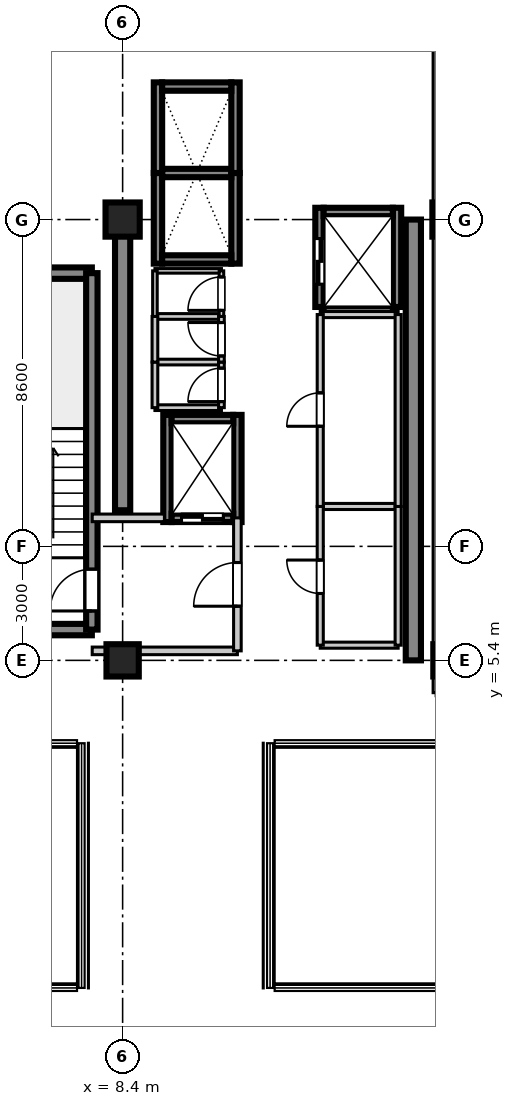
"""IFC4 building model, lengths in metres.
Left out: names, types, materials, properties, quantities, classifications, styles, units other than length and angle.
Written with IfcOpenShell. Run it as: python <this file> out.ifc"""

import sys

from ifc_helpers import new_model, si_unit, direction, frame, frame_2d, origin, origin_2d, place, context, subcontext, project, spatial, rectangle, extrude, source, transform, mapped, element, fill, save


model = new_model("IFC4")
c1 = context("Model", 3, precision=1e-05, world=origin(), true_north=direction((0.0, 1.0)))
c2 = subcontext(c1, "Body", "Model", "MODEL_VIEW")
j1 = project(units=[si_unit("LENGTHUNIT", "METRE"), si_unit("PLANEANGLEUNIT", "RADIAN")], contexts=[c1])
p1 = place(None, origin())
s1 = spatial("IfcSite", under=j1, at=p1, CompositionType="ELEMENT")
p2 = place(p1, origin())
s2 = spatial("IfcBuilding", under=s1, at=p2, CompositionType="ELEMENT")
p3 = place(p2, frame((0.0, 0.0, 304.2)))
s3 = spatial("IfcBuildingStorey", under=s2, at=p3, CompositionType="ELEMENT", Elevation=304.2)
m1 = source(origin(), c2, "Body", "SweptSolid", [
    extrude(rectangle(XDim=0.85, YDim=0.85, at=origin_2d()), origin(), (0.0, 0.0, 1.0), 3.805),
])
p4 = place(p3, frame((8.4, 5.4, 0.0), z_axis=(0.0, 0.0, 1.0), x_axis=(1.0, 0.0, 0.0)))
e1 = element("IfcColumn", 1, at=p4, inside=s3, PredefinedType="PILASTER", context=c2, shape_type="MappedRepresentation", body=[
    mapped(m1, transform((0.0, 0.0, 0.0), scale=1.0)),
])
m2 = source(origin(), c2, "Body", "SweptSolid", [
    extrude(rectangle(XDim=0.9, YDim=0.9, at=origin_2d()), origin(), (0.0, 0.0, 1.0), 3.805),
])
p5 = place(p3, frame((8.4, 17.0, 0.0), z_axis=(0.0, 0.0, 1.0), x_axis=(1.0, 0.0, 0.0)))
e2 = element("IfcColumn", 2, at=p5, inside=s3, PredefinedType="COLUMN", context=c2, shape_type="MappedRepresentation", body=[
    mapped(m2, transform((0.0, 0.0, 0.0), scale=1.0)),
])
p6 = place(p3, frame((17.0, 5.4, 0.0), z_axis=(0.0, 0.0, 1.0), x_axis=(1.0, 0.0, 0.0)))
e3 = element("IfcColumn", 3, at=p6, inside=s3, PredefinedType="PILASTER", context=c2, shape_type="MappedRepresentation", body=[
    mapped(m1, transform((0.0, 0.0, 0.0), scale=1.0)),
])
p7 = place(p3, frame((17.0, 17.0, 0.0), z_axis=(0.0, 0.0, 1.0), x_axis=(1.0, 0.0, 0.0)))
e4 = element("IfcColumn", 4, at=p7, inside=s3, PredefinedType="COLUMN", context=c2, shape_type="MappedRepresentation", body=[
    mapped(m2, transform((0.0, 0.0, 0.0), scale=1.0)),
])
m3 = source(origin(), c2, "Body", "SweptSolid", [
    extrude(rectangle(XDim=7.65, YDim=0.4, at=frame_2d((3.825, 0.0))), origin(), (0.0, 0.0, 1.0), 3.55),
])
p8 = place(p3, frame((8.4, 9.35, 0.0), z_axis=(0.0, 0.0, 1.0), x_axis=(0.0, 1.0, 0.0)))
e5 = element("IfcWall", 5, at=p8, inside=s3, PredefinedType="SHEAR", context=c2, shape_type="MappedRepresentation", body=[
    mapped(m3, transform((0.0, 0.0, 0.0), scale=1.0)),
])
m4 = source(origin(), c2, "Body", "SweptSolid", [
    extrude(rectangle(XDim=11.6, YDim=0.4, at=frame_2d((5.8, 0.0))), origin(), (0.0, 0.0, 1.0), 3.55),
])
p9 = place(p3, frame((16.05, 5.4, 0.0), z_axis=(0.0, 0.0, 1.0), x_axis=(0.0, 1.0, 0.0)))
e6 = element("IfcWall", 6, at=p9, inside=s3, PredefinedType="SHEAR", context=c2, shape_type="MappedRepresentation", body=[
    mapped(m4, transform((0.0, 0.0, 0.0), scale=1.0)),
])
m5 = source(origin(), c2, "Body", "SweptSolid", [
    extrude(rectangle(XDim=3.98, YDim=0.3, at=frame_2d((1.99, 0.0))), origin(), (0.0, 0.0, 1.0), 3.55),
])
for number, where, z_axis, x_axis in (
    (7, (3.61, 6.21, 0.0), (0.0, 0.0, 1.0), (1.0, 0.0, 0.0)),
    (8, (3.61, 15.59, 0.0), (0.0, 0.0, 1.0), (1.0, 0.0, 0.0)),
):
    element("IfcWall", number, at=place(p3, frame(where, z_axis=z_axis, x_axis=x_axis)), inside=s3, PredefinedType="SHEAR", context=c2, shape_type="MappedRepresentation", body=[
        mapped(m5, transform((0.0, 0.0, 0.0), scale=1.0)),
    ])
m6 = source(origin(), c2, "Body", "SweptSolid", [
    extrude(rectangle(XDim=9.38, YDim=0.3, at=frame_2d((4.69, 0.0))), origin(), (0.0, 0.0, 1.0), 3.55),
])
p10 = place(p3, frame((7.59, 6.21, 0.0), z_axis=(0.0, 0.0, 1.0), x_axis=(0.0, 1.0, 0.0)))
e9 = element("IfcWall", 9, at=p10, inside=s3, PredefinedType="SHEAR", context=c2, shape_type="MappedRepresentation", body=[
    mapped(m6, transform((0.0, 0.0, 0.0), scale=1.0)),
])
p11 = place(p10, frame((0.49, 0.0, 0.0)))
e10 = element("IfcOpeningElement", 10, at=p11, cuts=e9, PredefinedType="OPENING", context=c2, shape_type="SweptSolid", body=[
    extrude(rectangle(XDim=1.1, YDim=2.15, at=frame_2d((0.55, 1.075))), frame((0.0, 0.16, 0.0), z_axis=(0.0, -1.0, 0.0), x_axis=(1.0, 0.0, 0.0)), (0.0, 0.0, 1.0), 0.32),
])
m7 = source(origin(), c2, "Body", "SweptSolid", [
    extrude(rectangle(XDim=2.385, YDim=0.22, at=frame_2d((1.192, 0.0))), origin(), (0.0, 0.0, 1.0), 3.55),
])
for number, where, z_axis, x_axis in (
    (11, (9.33, 15.84, 0.0), (0.0, 0.0, 1.0), (0.0, 1.0, 0.0)),
    (12, (11.37, 15.84, 0.0), (0.0, 0.0, 1.0), (0.0, 1.0, 0.0)),
):
    element("IfcWall", number, at=place(p3, frame(where, z_axis=z_axis, x_axis=x_axis)), inside=s3, PredefinedType="SHEAR", context=c2, shape_type="MappedRepresentation", body=[
        mapped(m7, transform((0.0, 0.0, 0.0), scale=1.0)),
    ])
m8 = source(origin(), c2, "Body", "SweptSolid", [
    extrude(rectangle(XDim=1.82, YDim=0.22, at=frame_2d((0.91, 0.0))), origin(), (0.0, 0.0, 1.0), 3.55),
])
p12 = place(p3, frame((9.44, 15.95, 0.0), z_axis=(0.0, 0.0, 1.0), x_axis=(1.0, 0.0, 0.0)))
e13 = element("IfcWall", 13, at=p12, inside=s3, PredefinedType="SHEAR", context=c2, shape_type="MappedRepresentation", body=[
    mapped(m8, transform((0.0, 0.0, 0.0), scale=1.0)),
])
m9 = source(origin(), c2, "Body", "SweptSolid", [
    extrude(rectangle(XDim=1.82, YDim=0.22, at=frame_2d((0.91, 0.0))), origin(), (0.0, 0.0, 1.0), 3.85),
])
p13 = place(p3, frame((9.44, 18.225, 0.0), z_axis=(0.0, 0.0, 1.0), x_axis=(1.0, 0.0, 0.0)))
e14 = element("IfcWall", 14, at=p13, inside=s3, PredefinedType="SHEAR", context=c2, shape_type="MappedRepresentation", body=[
    mapped(m9, transform((0.0, 0.0, 0.0), scale=1.0)),
])
for number, where, z_axis, x_axis in (
    (15, (9.33, 18.225, 0.0), (0.0, 0.0, 1.0), (0.0, 1.0, 0.0)),
    (16, (11.37, 18.225, 0.0), (0.0, 0.0, 1.0), (0.0, 1.0, 0.0)),
):
    element("IfcWall", number, at=place(p3, frame(where, z_axis=z_axis, x_axis=x_axis)), inside=s3, PredefinedType="SHEAR", context=c2, shape_type="MappedRepresentation", body=[
        mapped(m7, transform((0.0, 0.0, 0.0), scale=1.0)),
    ])
p14 = place(p3, frame((9.44, 20.5, 0.0), z_axis=(0.0, 0.0, 1.0), x_axis=(1.0, 0.0, 0.0)))
e17 = element("IfcWall", 17, at=p14, inside=s3, PredefinedType="SHEAR", context=c2, shape_type="MappedRepresentation", body=[
    mapped(m8, transform((0.0, 0.0, 0.0), scale=1.0)),
])
m10 = source(origin(), c2, "Body", "SweptSolid", [
    extrude(rectangle(XDim=2.82, YDim=0.22, at=frame_2d((1.41, 0.0))), origin(), (0.0, 0.0, 1.0), 3.55),
])
for number, where, z_axis, x_axis in (
    (18, (9.58, 9.04, 0.0), (0.0, 0.0, 1.0), (0.0, 1.0, 0.0)),
    (19, (11.42, 9.04, 0.0), (0.0, 0.0, 1.0), (0.0, 1.0, 0.0)),
):
    element("IfcWall", number, at=place(p3, frame(where, z_axis=z_axis, x_axis=x_axis)), inside=s3, PredefinedType="SHEAR", context=c2, shape_type="MappedRepresentation", body=[
        mapped(m10, transform((0.0, 0.0, 0.0), scale=1.0)),
    ])
m11 = source(origin(), c2, "Body", "SweptSolid", [
    extrude(rectangle(XDim=1.62, YDim=0.22, at=frame_2d((0.81, 0.0))), origin(), (0.0, 0.0, 1.0), 3.55),
])
p15 = place(p3, frame((9.69, 9.15, 0.0), z_axis=(0.0, 0.0, 1.0), x_axis=(1.0, 0.0, 0.0)))
e20 = element("IfcWall", 20, at=p15, inside=s3, PredefinedType="SHEAR", context=c2, shape_type="MappedRepresentation", body=[
    mapped(m11, transform((0.0, 0.0, 0.0), scale=1.0)),
])
p16 = place(p15, frame((0.26, 0.0, 0.0)))
e21 = element("IfcOpeningElement", 21, at=p16, cuts=e20, PredefinedType="OPENING", context=c2, shape_type="SweptSolid", body=[
    extrude(rectangle(XDim=1.1, YDim=2.2, at=frame_2d((0.55, 1.1))), frame((0.0, 0.12, 0.0), z_axis=(0.0, -1.0, 0.0), x_axis=(1.0, 0.0, 0.0)), (0.0, 0.0, 1.0), 0.24),
])
p17 = place(p3, frame((9.69, 11.75, 0.0), z_axis=(0.0, 0.0, 1.0), x_axis=(1.0, 0.0, 0.0)))
e22 = element("IfcWall", 22, at=p17, inside=s3, PredefinedType="SHEAR", context=c2, shape_type="MappedRepresentation", body=[
    mapped(m11, transform((0.0, 0.0, 0.0), scale=1.0)),
])
m12 = source(origin(), c2, "Body", "SweptSolid", [
    extrude(rectangle(XDim=2.61, YDim=0.22, at=frame_2d((1.305, 0.0))), origin(), (0.0, 0.0, 1.0), 3.55),
])
p18 = place(p3, frame((13.58, 14.7, 0.0), z_axis=(0.0, 0.0, 1.0), x_axis=(0.0, 1.0, 0.0)))
e23 = element("IfcWall", 23, at=p18, inside=s3, PredefinedType="SHEAR", context=c2, shape_type="MappedRepresentation", body=[
    mapped(m12, transform((0.0, 0.0, 0.0), scale=1.0)),
])
p19 = place(p18, frame((0.6, 0.0, 0.0)))
e24 = element("IfcOpeningElement", 24, at=p19, cuts=e23, PredefinedType="OPENING", context=c2, shape_type="SweptSolid", body=[
    extrude(rectangle(XDim=1.2, YDim=2.2, at=frame_2d((0.6, 1.1))), frame((0.0, 0.12, 0.0), z_axis=(0.0, -1.0, 0.0), x_axis=(1.0, 0.0, 0.0)), (0.0, 0.0, 1.0), 0.24),
])
p20 = place(p3, frame((15.62, 14.7, 0.0), z_axis=(0.0, 0.0, 1.0), x_axis=(0.0, 1.0, 0.0)))
e25 = element("IfcWall", 25, at=p20, inside=s3, PredefinedType="SHEAR", context=c2, shape_type="MappedRepresentation", body=[
    mapped(m12, transform((0.0, 0.0, 0.0), scale=1.0)),
])
p21 = place(p3, frame((13.69, 17.2, 0.0), z_axis=(0.0, 0.0, 1.0), x_axis=(1.0, 0.0, 0.0)))
e26 = element("IfcWall", 26, at=p21, inside=s3, PredefinedType="SHEAR", context=c2, shape_type="MappedRepresentation", body=[
    mapped(m8, transform((0.0, 0.0, 0.0), scale=1.0)),
])
m13 = source(origin(), c2, "Body", "SweptSolid", [
    extrude(rectangle(XDim=3.82, YDim=0.2, at=frame_2d((1.91, 0.0))), origin(), (0.0, 0.0, 1.0), 2.89),
])
p22 = place(p3, frame((7.6, 5.65, 0.0), z_axis=(0.0, 0.0, 1.0), x_axis=(1.0, 0.0, 0.0)))
e27 = element("IfcWall", 27, at=p22, inside=s3, PredefinedType="PARTITIONING", context=c2, shape_type="MappedRepresentation", body=[
    mapped(m13, transform((0.0, 0.0, 0.0), scale=1.0)),
])
m14 = source(origin(), c2, "Body", "SweptSolid", [
    extrude(rectangle(XDim=1.9, YDim=0.2, at=frame_2d((0.95, 0.0))), origin(), (0.0, 0.0, 1.0), 2.89),
])
p23 = place(p3, frame((7.6, 9.15, 0.0), z_axis=(0.0, 0.0, 1.0), x_axis=(1.0, 0.0, 0.0)))
e28 = element("IfcWall", 28, at=p23, inside=s3, PredefinedType="PARTITIONING", context=c2, shape_type="MappedRepresentation", body=[
    mapped(m14, transform((0.0, 0.0, 0.0), scale=1.0)),
])
m15 = source(origin(), c2, "Body", "SweptSolid", [
    extrude(rectangle(XDim=3.5, YDim=0.2, at=frame_2d((1.75, 0.0))), origin(), (0.0, 0.0, 1.0), 2.89),
])
p24 = place(p3, frame((11.42, 5.65, 0.0), z_axis=(0.0, 0.0, 1.0), x_axis=(0.0, 1.0, 0.0)))
e29 = element("IfcWall", 29, at=p24, inside=s3, PredefinedType="PARTITIONING", context=c2, shape_type="MappedRepresentation", body=[
    mapped(m15, transform((0.0, 0.0, 0.0), scale=1.0)),
])
p25 = place(p24, frame((1.175, 0.0, 0.0)))
e30 = element("IfcOpeningElement", 30, at=p25, cuts=e29, PredefinedType="OPENING", context=c2, shape_type="SweptSolid", body=[
    extrude(rectangle(XDim=1.15, YDim=2.15, at=frame_2d((0.575, 1.075))), frame((0.0, 0.11, 0.0), z_axis=(0.0, -1.0, 0.0), x_axis=(1.0, 0.0, 0.0)), (0.0, 0.0, 1.0), 0.22),
])
m16 = source(origin(), c2, "Body", "SweptSolid", [
    extrude(rectangle(XDim=1.75, YDim=0.15, at=frame_2d((0.875, 0.0))), origin(), (0.0, 0.0, 1.0), 2.89),
])
for number, where, z_axis, x_axis in (
    (31, (9.25, 12.05, 0.0), (0.0, 0.0, 1.0), (1.0, 0.0, 0.0)),
    (32, (9.25, 13.25, 0.0), (0.0, 0.0, 1.0), (1.0, 0.0, 0.0)),
):
    element("IfcWall", number, at=place(p3, frame(where, z_axis=z_axis, x_axis=x_axis)), inside=s3, PredefinedType="PARTITIONING", context=c2, shape_type="MappedRepresentation", body=[
        mapped(m16, transform((0.0, 0.0, 0.0), scale=1.0)),
    ])
m17 = source(origin(), c2, "Body", "SweptSolid", [
    extrude(rectangle(XDim=1.2, YDim=0.15, at=frame_2d((0.6, 0.0))), origin(), (0.0, 0.0, 1.0), 2.89),
])
p26 = place(p3, frame((9.25, 12.05, 0.0), z_axis=(0.0, 0.0, 1.0), x_axis=(0.0, 1.0, 0.0)))
e33 = element("IfcWall", 33, at=p26, inside=s3, PredefinedType="PARTITIONING", context=c2, shape_type="MappedRepresentation", body=[
    mapped(m17, transform((0.0, 0.0, 0.0), scale=1.0)),
])
p27 = place(p3, frame((11.0, 12.05, 0.0), z_axis=(0.0, 0.0, 1.0), x_axis=(0.0, 1.0, 0.0)))
e34 = element("IfcWall", 34, at=p27, inside=s3, PredefinedType="PARTITIONING", context=c2, shape_type="MappedRepresentation", body=[
    mapped(m17, transform((0.0, 0.0, 0.0), scale=1.0)),
])
p28 = place(p27, frame((0.16, 0.0, 0.0)))
e35 = element("IfcOpeningElement", 35, at=p28, cuts=e34, PredefinedType="OPENING", context=c2, shape_type="SweptSolid", body=[
    extrude(rectangle(XDim=0.88, YDim=2.1, at=frame_2d((0.44, 1.05))), frame((0.0, 0.085, 0.0), z_axis=(0.0, -1.0, 0.0), x_axis=(1.0, 0.0, 0.0)), (0.0, 0.0, 1.0), 0.17),
])
p29 = place(p3, frame((9.25, 14.45, 0.0), z_axis=(0.0, 0.0, 1.0), x_axis=(1.0, 0.0, 0.0)))
e36 = element("IfcWall", 36, at=p29, inside=s3, PredefinedType="PARTITIONING", context=c2, shape_type="MappedRepresentation", body=[
    mapped(m16, transform((0.0, 0.0, 0.0), scale=1.0)),
])
p30 = place(p3, frame((9.25, 13.25, 0.0), z_axis=(0.0, 0.0, 1.0), x_axis=(0.0, 1.0, 0.0)))
e37 = element("IfcWall", 37, at=p30, inside=s3, PredefinedType="PARTITIONING", context=c2, shape_type="MappedRepresentation", body=[
    mapped(m17, transform((0.0, 0.0, 0.0), scale=1.0)),
])
p31 = place(p3, frame((11.0, 13.25, 0.0), z_axis=(0.0, 0.0, 1.0), x_axis=(0.0, 1.0, 0.0)))
e38 = element("IfcWall", 38, at=p31, inside=s3, PredefinedType="PARTITIONING", context=c2, shape_type="MappedRepresentation", body=[
    mapped(m17, transform((0.0, 0.0, 0.0), scale=1.0)),
])
p32 = place(p31, frame((0.16, 0.0, 0.0)))
e39 = element("IfcOpeningElement", 39, at=p32, cuts=e38, PredefinedType="OPENING", context=c2, shape_type="SweptSolid", body=[
    extrude(rectangle(XDim=0.88, YDim=2.1, at=frame_2d((0.44, 1.05))), frame((0.0, 0.085, 0.0), z_axis=(0.0, -1.0, 0.0), x_axis=(1.0, 0.0, 0.0)), (0.0, 0.0, 1.0), 0.17),
])
m18 = source(origin(), c2, "Body", "SweptSolid", [
    extrude(rectangle(XDim=1.75, YDim=0.12, at=frame_2d((0.875, 0.0))), origin(), (0.0, 0.0, 1.0), 2.89),
])
p33 = place(p3, frame((9.25, 15.65, 0.0), z_axis=(0.0, 0.0, 1.0), x_axis=(1.0, 0.0, 0.0)))
e40 = element("IfcWall", 40, at=p33, inside=s3, PredefinedType="PARTITIONING", context=c2, shape_type="MappedRepresentation", body=[
    mapped(m18, transform((0.0, 0.0, 0.0), scale=1.0)),
])
m19 = source(origin(), c2, "Body", "SweptSolid", [
    extrude(rectangle(XDim=1.2, YDim=0.12, at=frame_2d((0.6, 0.0))), origin(), (0.0, 0.0, 1.0), 2.89),
])
p34 = place(p3, frame((9.25, 14.45, 0.0), z_axis=(0.0, 0.0, 1.0), x_axis=(0.0, 1.0, 0.0)))
e41 = element("IfcWall", 41, at=p34, inside=s3, PredefinedType="PARTITIONING", context=c2, shape_type="MappedRepresentation", body=[
    mapped(m19, transform((0.0, 0.0, 0.0), scale=1.0)),
])
p35 = place(p3, frame((11.0, 14.45, 0.0), z_axis=(0.0, 0.0, 1.0), x_axis=(0.0, 1.0, 0.0)))
e42 = element("IfcWall", 42, at=p35, inside=s3, PredefinedType="PARTITIONING", context=c2, shape_type="MappedRepresentation", body=[
    mapped(m19, transform((0.0, 0.0, 0.0), scale=1.0)),
])
p36 = place(p35, frame((0.16, 0.0, 0.0)))
e43 = element("IfcOpeningElement", 43, at=p36, cuts=e42, PredefinedType="OPENING", context=c2, shape_type="SweptSolid", body=[
    extrude(rectangle(XDim=0.88, YDim=2.1, at=frame_2d((0.44, 1.05))), frame((0.0, 0.07, 0.0), z_axis=(0.0, -1.0, 0.0), x_axis=(1.0, 0.0, 0.0)), (0.0, 0.0, 1.0), 0.14),
])
m20 = source(origin(), c2, "Body", "SweptSolid", [
    extrude(rectangle(XDim=2.05, YDim=0.16, at=frame_2d((1.025, 0.0))), origin(), (0.0, 0.0, 1.0), 2.89),
])
for number, where, z_axis, x_axis in (
    (44, (13.6, 5.8, 0.0), (0.0, 0.0, 1.0), (1.0, 0.0, 0.0)),
    (45, (13.6, 9.45, 0.0), (0.0, 0.0, 1.0), (1.0, 0.0, 0.0)),
):
    element("IfcWall", number, at=place(p3, frame(where, z_axis=z_axis, x_axis=x_axis)), inside=s3, PredefinedType="PARTITIONING", context=c2, shape_type="MappedRepresentation", body=[
        mapped(m20, transform((0.0, 0.0, 0.0), scale=1.0)),
    ])
m21 = source(origin(), c2, "Body", "SweptSolid", [
    extrude(rectangle(XDim=3.65, YDim=0.16, at=frame_2d((1.825, 0.0))), origin(), (0.0, 0.0, 1.0), 2.89),
])
p37 = place(p3, frame((13.6, 5.8, 0.0), z_axis=(0.0, 0.0, 1.0), x_axis=(0.0, 1.0, 0.0)))
e46 = element("IfcWall", 46, at=p37, inside=s3, PredefinedType="PARTITIONING", context=c2, shape_type="MappedRepresentation", body=[
    mapped(m21, transform((0.0, 0.0, 0.0), scale=1.0)),
])
p38 = place(p37, frame((1.36, 0.0, 0.0)))
e47 = element("IfcOpeningElement", 47, at=p38, cuts=e46, PredefinedType="OPENING", context=c2, shape_type="SweptSolid", body=[
    extrude(rectangle(XDim=0.88, YDim=2.1, at=frame_2d((0.44, 1.05))), frame((0.0, 0.09, 0.0), z_axis=(0.0, -1.0, 0.0), x_axis=(1.0, 0.0, 0.0)), (0.0, 0.0, 1.0), 0.18),
])
p39 = place(p3, frame((15.65, 5.8, 0.0), z_axis=(0.0, 0.0, 1.0), x_axis=(0.0, 1.0, 0.0)))
e48 = element("IfcWall", 48, at=p39, inside=s3, PredefinedType="PARTITIONING", context=c2, shape_type="MappedRepresentation", body=[
    mapped(m21, transform((0.0, 0.0, 0.0), scale=1.0)),
])
p40 = place(p3, frame((13.6, 14.5, 0.0), z_axis=(0.0, 0.0, 1.0), x_axis=(1.0, 0.0, 0.0)))
e49 = element("IfcWall", 49, at=p40, inside=s3, PredefinedType="PARTITIONING", context=c2, shape_type="MappedRepresentation", body=[
    mapped(m20, transform((0.0, 0.0, 0.0), scale=1.0)),
])
m22 = source(origin(), c2, "Body", "SweptSolid", [
    extrude(rectangle(XDim=5.05, YDim=0.16, at=frame_2d((2.525, 0.0))), origin(), (0.0, 0.0, 1.0), 2.89),
])
p41 = place(p3, frame((13.6, 9.45, 0.0), z_axis=(0.0, 0.0, 1.0), x_axis=(0.0, 1.0, 0.0)))
e50 = element("IfcWall", 50, at=p41, inside=s3, PredefinedType="PARTITIONING", context=c2, shape_type="MappedRepresentation", body=[
    mapped(m22, transform((0.0, 0.0, 0.0), scale=1.0)),
])
p42 = place(p41, frame((2.11, 0.0, 0.0)))
e51 = element("IfcOpeningElement", 51, at=p42, cuts=e50, PredefinedType="OPENING", context=c2, shape_type="SweptSolid", body=[
    extrude(rectangle(XDim=0.88, YDim=2.1, at=frame_2d((0.44, 1.05))), frame((0.0, 0.09, 0.0), z_axis=(0.0, -1.0, 0.0), x_axis=(1.0, 0.0, 0.0)), (0.0, 0.0, 1.0), 0.18),
])
p43 = place(p3, frame((15.65, 9.45, 0.0), z_axis=(0.0, 0.0, 1.0), x_axis=(0.0, 1.0, 0.0)))
e52 = element("IfcWall", 52, at=p43, inside=s3, PredefinedType="PARTITIONING", context=c2, shape_type="MappedRepresentation", body=[
    mapped(m22, transform((0.0, 0.0, 0.0), scale=1.0)),
])
m23 = source(origin(), c2, "Body", "SweptSolid", [
    extrude(rectangle(XDim=17.95, YDim=0.16, at=frame_2d((8.975, 0.0))), origin(), (0.0, 0.0, 1.0), 2.89),
])
p44 = place(p3, frame((16.65, 4.55, 0.0), z_axis=(0.0, 0.0, 1.0), x_axis=(0.0, 1.0, 0.0)))
e53 = element("IfcWall", 53, at=p44, inside=s3, PredefinedType="PARTITIONING", context=c2, shape_type="MappedRepresentation", body=[
    mapped(m23, transform((0.0, 0.0, 0.0), scale=1.0)),
])
m24 = source(origin(), c2, "Body", "SweptSolid", [
    extrude(rectangle(XDim=1.1, YDim=2.15, at=frame_2d((0.55, 1.075))), frame((0.0, 0.025, 0.0), z_axis=(0.0, -1.0, 0.0), x_axis=(1.0, 0.0, 0.0)), (0.0, 0.0, 1.0), 0.05),
])
p45 = place(p11, origin())
e54 = element("IfcDoor", 54, at=p45, inside=s3, OperationType="SINGLE_SWING_LEFT", PredefinedType="DOOR", context=c2, shape_type="MappedRepresentation", body=[
    mapped(m24, transform((0.0, 0.0, 0.0), scale=1.0)),
])
fill(e10, e54)
m25 = source(origin(), c2, "Body", "SweptSolid", [
    extrude(rectangle(XDim=1.1, YDim=2.2, at=frame_2d((0.55, 1.1))), frame((0.0, 0.025, 0.0), z_axis=(0.0, -1.0, 0.0), x_axis=(1.0, 0.0, 0.0)), (0.0, 0.0, 1.0), 0.05),
])
p46 = place(p16, frame((1.1, 0.0, 0.0), z_axis=(0.0, 0.0, 1.0), x_axis=(-1.0, 0.0, 0.0)))
e55 = element("IfcDoor", 55, at=p46, inside=s3, OperationType="DOUBLE_DOOR_SLIDING", PredefinedType="DOOR", context=c2, shape_type="MappedRepresentation", body=[
    mapped(m25, transform((0.0, 0.0, 0.0), scale=1.0)),
])
fill(e21, e55)
m26 = source(origin(), c2, "Body", "SweptSolid", [
    extrude(rectangle(XDim=1.2, YDim=2.2, at=frame_2d((0.6, 1.1))), frame((0.0, 0.025, 0.0), z_axis=(0.0, -1.0, 0.0), x_axis=(1.0, 0.0, 0.0)), (0.0, 0.0, 1.0), 0.05),
])
p47 = place(p19, origin())
e56 = element("IfcDoor", 56, at=p47, inside=s3, OperationType="DOUBLE_DOOR_SLIDING", PredefinedType="DOOR", context=c2, shape_type="MappedRepresentation", body=[
    mapped(m26, transform((0.0, 0.0, 0.0), scale=1.0)),
])
fill(e24, e56)
m27 = source(origin(), c2, "Body", "SweptSolid", [
    extrude(rectangle(XDim=1.15, YDim=2.15, at=frame_2d((0.575, 1.075))), frame((0.0, 0.025, 0.0), z_axis=(0.0, -1.0, 0.0), x_axis=(1.0, 0.0, 0.0)), (0.0, 0.0, 1.0), 0.05),
])
p48 = place(p25, frame((1.15, 0.0, 0.0), z_axis=(0.0, 0.0, 1.0), x_axis=(-1.0, 0.0, 0.0)))
e57 = element("IfcDoor", 57, at=p48, inside=s3, OperationType="SINGLE_SWING_LEFT", PredefinedType="DOOR", context=c2, shape_type="MappedRepresentation", body=[
    mapped(m27, transform((0.0, 0.0, 0.0), scale=1.0)),
])
fill(e30, e57)
m28 = source(origin(), c2, "Body", "SweptSolid", [
    extrude(rectangle(XDim=0.88, YDim=2.1, at=frame_2d((0.44, 1.05))), frame((0.0, 0.025, 0.0), z_axis=(0.0, -1.0, 0.0), x_axis=(1.0, 0.0, 0.0)), (0.0, 0.0, 1.0), 0.05),
])
p49 = place(p28, origin())
e58 = element("IfcDoor", 58, at=p49, inside=s3, OperationType="SINGLE_SWING_LEFT", PredefinedType="DOOR", context=c2, shape_type="MappedRepresentation", body=[
    mapped(m28, transform((0.0, 0.0, 0.0), scale=1.0)),
])
fill(e35, e58)
p50 = place(p32, origin())
e59 = element("IfcDoor", 59, at=p50, inside=s3, OperationType="SINGLE_SWING_RIGHT", PredefinedType="DOOR", context=c2, shape_type="MappedRepresentation", body=[
    mapped(m28, transform((0.0, 0.0, 0.0), scale=1.0)),
])
fill(e39, e59)
p51 = place(p36, origin())
e60 = element("IfcDoor", 60, at=p51, inside=s3, OperationType="SINGLE_SWING_LEFT", PredefinedType="DOOR", context=c2, shape_type="MappedRepresentation", body=[
    mapped(m28, transform((0.0, 0.0, 0.0), scale=1.0)),
])
fill(e43, e60)
p52 = place(p38, frame((0.88, 0.0, 0.0), z_axis=(0.0, 0.0, 1.0), x_axis=(-1.0, 0.0, 0.0)))
e61 = element("IfcDoor", 61, at=p52, inside=s3, OperationType="SINGLE_SWING_RIGHT", PredefinedType="DOOR", context=c2, shape_type="MappedRepresentation", body=[
    mapped(m28, transform((0.0, 0.0, 0.0), scale=1.0)),
])
fill(e47, e61)
p53 = place(p42, frame((0.88, 0.0, 0.0), z_axis=(0.0, 0.0, 1.0), x_axis=(-1.0, 0.0, 0.0)))
e62 = element("IfcDoor", 62, at=p53, inside=s3, OperationType="SINGLE_SWING_LEFT", PredefinedType="DOOR", context=c2, shape_type="MappedRepresentation", body=[
    mapped(m28, transform((0.0, 0.0, 0.0), scale=1.0)),
])
fill(e51, e62)
save(model, sys.argv[1])
